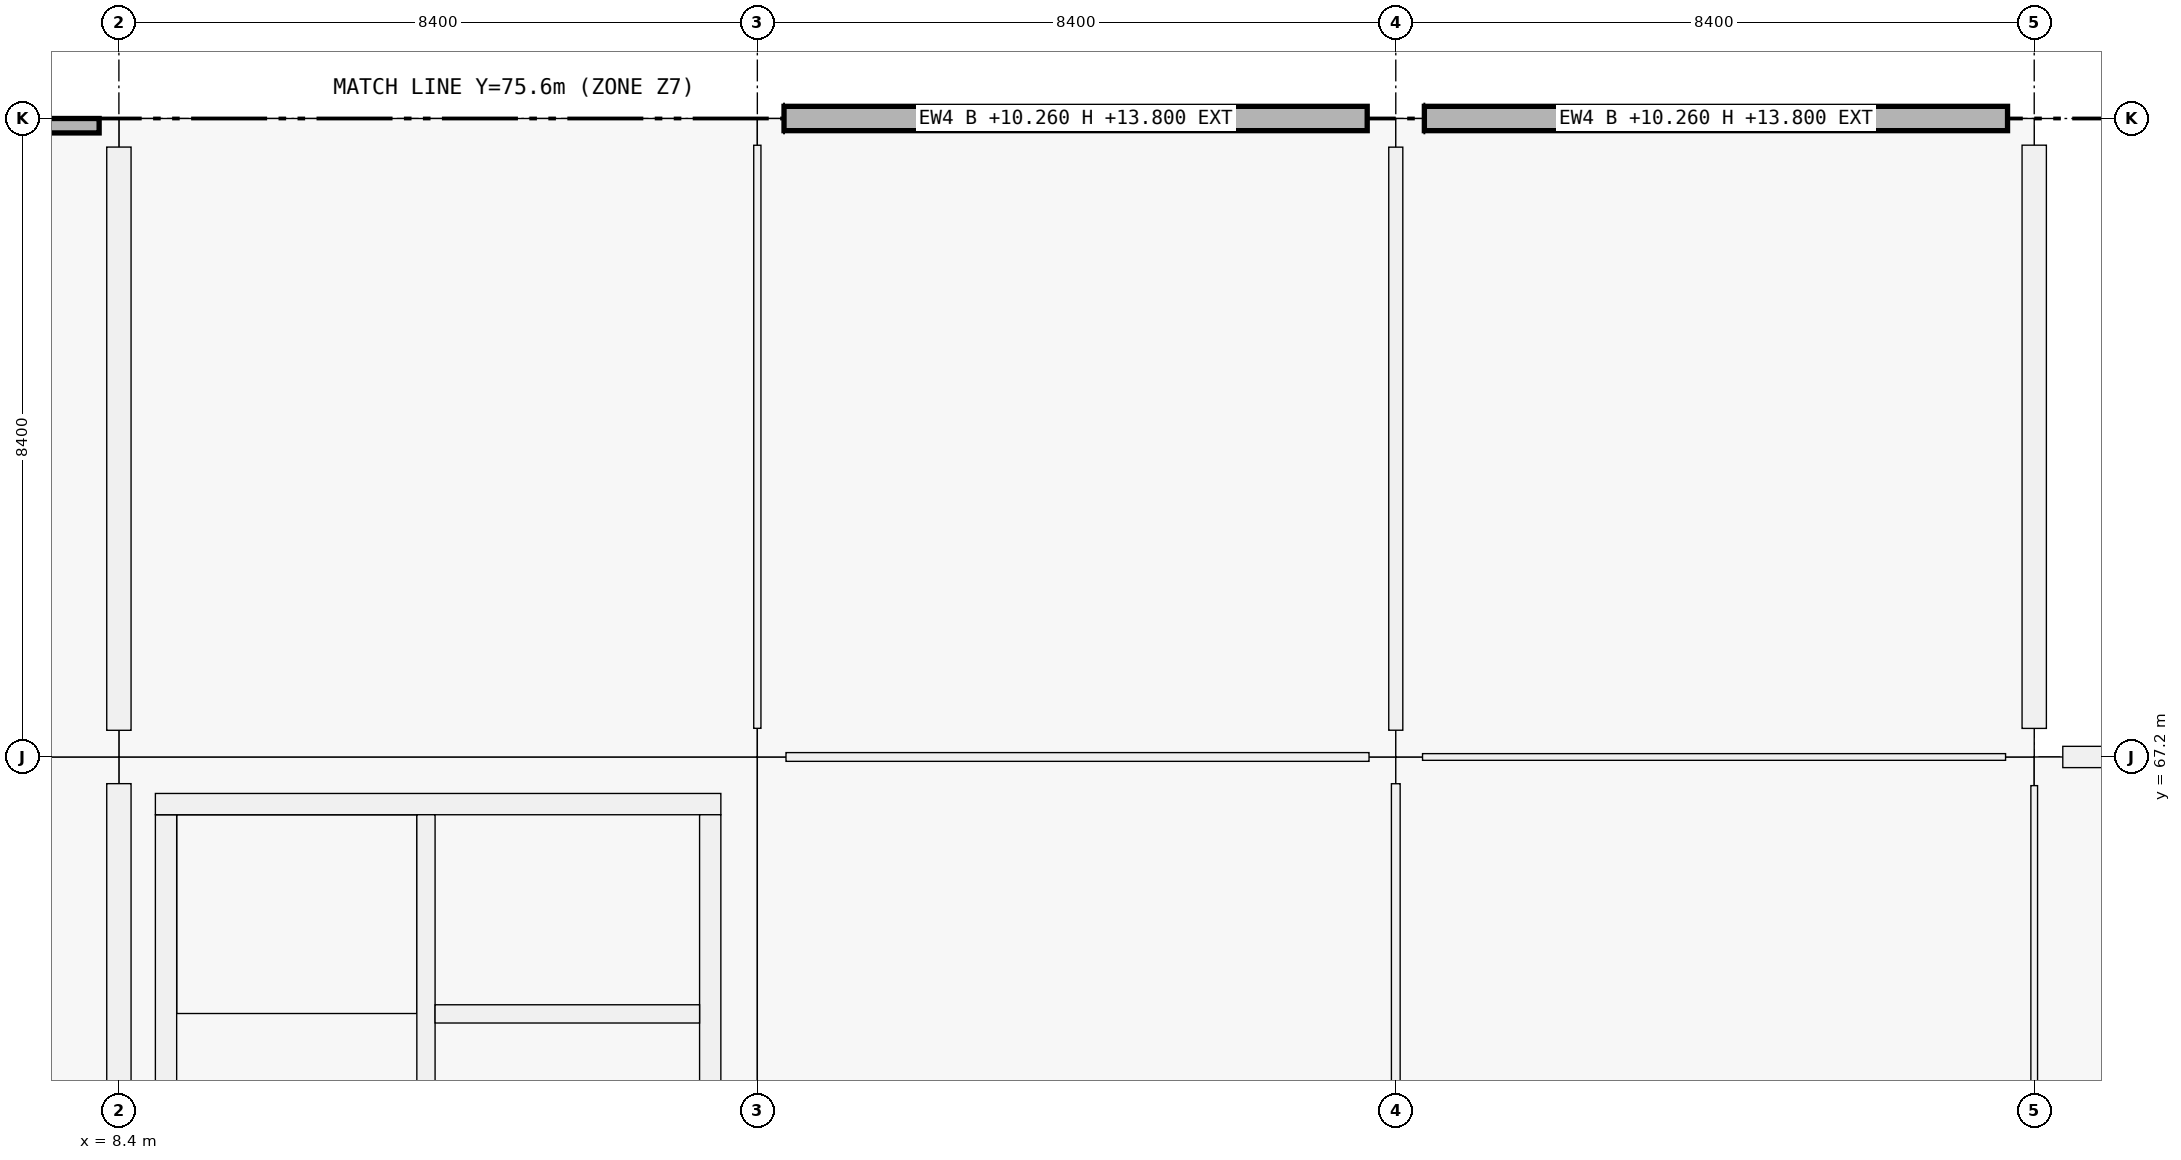
"""IFC4 building model, lengths in metres.
Left out: names, types, materials, properties, quantities, classifications, styles, units other than length and angle.
Written with IfcOpenShell. Run it as: python <this file> out.ifc"""

import sys

from ifc_helpers import new_model, si_unit, direction, frame, frame_2d, origin, origin_2d, place, context, subcontext, project, spatial, rectangle, extrude, element, fill, save


model = new_model("IFC4")
c1 = context("Model", 3, precision=1e-05, world=origin(), true_north=direction((0.0, 1.0)))
c2 = subcontext(c1, "Body", "Model", "MODEL_VIEW")
j1 = project(units=[si_unit("LENGTHUNIT", "METRE"), si_unit("PLANEANGLEUNIT", "RADIAN")], contexts=[c1])
p1 = place(None, origin())
s1 = spatial("IfcSite", under=j1, at=p1, CompositionType="ELEMENT")
p2 = place(p1, origin())
s2 = spatial("IfcBuilding", under=s1, at=p2, CompositionType="ELEMENT")
p3 = place(p2, frame((0.0, 0.0, 10.26)))
s3 = spatial("IfcBuildingStorey", under=s2, at=p3, CompositionType="ELEMENT", Elevation=10.26)
p4 = place(p3, frame((8.4, 67.2, 0.0), z_axis=(0.0, 0.0, 1.0), x_axis=(1.0, 0.0, 0.0)))
e1 = element("IfcColumn", 1, at=p4, inside=s3, PredefinedType="COLUMN", context=c2, shape_type="SweptSolid", body=[
    extrude(rectangle(XDim=0.7, YDim=0.7, at=origin_2d()), origin(), (0.0, 0.0, 1.0), 4.5),
])
for number, where, z_axis, x_axis in (
    (2, (8.4, 75.6, 0.0), (0.0, 0.0, 1.0), (1.0, 0.0, 0.0)),
    (3, (16.8, 67.2, 0.0), (0.0, 0.0, 1.0), (1.0, 0.0, 0.0)),
):
    element("IfcColumn", number, at=place(p3, frame(where, z_axis=z_axis, x_axis=x_axis)), inside=s3, PredefinedType="COLUMN", context=c2, shape_type="SweptSolid", body=[
        extrude(rectangle(XDim=0.75, YDim=0.75, at=origin_2d()), origin(), (0.0, 0.0, 1.0), 4.5),
    ])
for number, where, z_axis, x_axis in (
    (4, (16.8, 75.6, 0.0), (0.0, 0.0, 1.0), (1.0, 0.0, 0.0)),
    (5, (25.2, 67.2, 0.0), (0.0, 0.0, 1.0), (1.0, 0.0, 0.0)),
):
    element("IfcColumn", number, at=place(p3, frame(where, z_axis=z_axis, x_axis=x_axis)), inside=s3, PredefinedType="COLUMN", context=c2, shape_type="SweptSolid", body=[
        extrude(rectangle(XDim=0.7, YDim=0.7, at=origin_2d()), origin(), (0.0, 0.0, 1.0), 4.5),
    ])
for number, where, z_axis, x_axis in (
    (6, (25.2, 75.6, 0.0), (0.0, 0.0, 1.0), (1.0, 0.0, 0.0)),
    (7, (33.6, 67.2, 0.0), (0.0, 0.0, 1.0), (1.0, 0.0, 0.0)),
):
    element("IfcColumn", number, at=place(p3, frame(where, z_axis=z_axis, x_axis=x_axis)), inside=s3, PredefinedType="COLUMN", context=c2, shape_type="SweptSolid", body=[
        extrude(rectangle(XDim=0.75, YDim=0.75, at=origin_2d()), origin(), (0.0, 0.0, 1.0), 4.5),
    ])
p5 = place(p3, frame((33.6, 75.6, 0.0), z_axis=(0.0, 0.0, 1.0), x_axis=(1.0, 0.0, 0.0)))
e8 = element("IfcColumn", 8, at=p5, inside=s3, PredefinedType="COLUMN", context=c2, shape_type="SweptSolid", body=[
    extrude(rectangle(XDim=0.7, YDim=0.7, at=origin_2d()), origin(), (0.0, 0.0, 1.0), 4.5),
])
p6 = place(p3, frame((8.4, 59.176, 0.0), z_axis=(0.0, 0.0, 1.0), x_axis=(0.0, 1.0, 0.0)))
e9 = element("IfcWall", 9, at=p6, inside=s3, PredefinedType="SOLIDWALL", context=c2, shape_type="SweptSolid", body=[
    extrude(rectangle(XDim=7.673, YDim=0.32, at=frame_2d((3.836, 0.0))), origin(), (0.0, 0.0, 1.0), 3.54),
])
p7 = place(p3, frame((8.4, 67.551, 0.0), z_axis=(0.0, 0.0, 1.0), x_axis=(0.0, 1.0, 0.0)))
e10 = element("IfcWall", 10, at=p7, inside=s3, PredefinedType="SOLIDWALL", context=c2, shape_type="SweptSolid", body=[
    extrude(rectangle(XDim=7.673, YDim=0.32, at=frame_2d((3.836, 0.0))), origin(), (0.0, 0.0, 1.0), 3.54),
])
p8 = place(p7, frame((2.787, 0.0, 0.9)))
e11 = element("IfcOpeningElement", 11, at=p8, cuts=e10, PredefinedType="OPENING", context=c2, shape_type="SweptSolid", body=[
    extrude(rectangle(XDim=2.1, YDim=1.8, at=frame_2d((1.05, 0.9))), frame((0.0, 0.16, 0.0), z_axis=(0.0, -1.0, 0.0), x_axis=(1.0, 0.0, 0.0)), (0.0, 0.0, 1.0), 0.32),
])
p9 = place(p3, frame((17.151, 75.6, 0.0), z_axis=(0.0, 0.0, 1.0), x_axis=(1.0, 0.0, 0.0)))
e12 = element("IfcWall", 12, at=p9, inside=s3, PredefinedType="SOLIDWALL", context=c2, shape_type="SweptSolid", body=[
    extrude(rectangle(XDim=7.673, YDim=0.32, at=frame_2d((3.836, 0.0))), origin(), (0.0, 0.0, 1.0), 3.54),
])
p10 = place(p9, frame((2.636, 0.0, 0.9)))
e13 = element("IfcOpeningElement", 13, at=p10, cuts=e12, PredefinedType="OPENING", context=c2, shape_type="SweptSolid", body=[
    extrude(rectangle(XDim=2.4, YDim=1.8, at=frame_2d((1.2, 0.9))), frame((0.0, 0.16, 0.0), z_axis=(0.0, -1.0, 0.0), x_axis=(1.0, 0.0, 0.0)), (0.0, 0.0, 1.0), 0.32),
])
p11 = place(p3, frame((25.576, 75.6, 0.0), z_axis=(0.0, 0.0, 1.0), x_axis=(1.0, 0.0, 0.0)))
e14 = element("IfcWall", 14, at=p11, inside=s3, PredefinedType="SOLIDWALL", context=c2, shape_type="SweptSolid", body=[
    extrude(rectangle(XDim=7.673, YDim=0.32, at=frame_2d((3.836, 0.0))), origin(), (0.0, 0.0, 1.0), 3.54),
])
p12 = place(p11, frame((2.337, 0.0, 0.9)))
e15 = element("IfcOpeningElement", 15, at=p12, cuts=e14, PredefinedType="OPENING", context=c2, shape_type="SweptSolid", body=[
    extrude(rectangle(XDim=3.0, YDim=1.2, at=frame_2d((1.5, 0.6))), frame((0.0, 0.16, 0.0), z_axis=(0.0, -1.0, 0.0), x_axis=(1.0, 0.0, 0.0)), (0.0, 0.0, 1.0), 0.32),
])
p13 = place(p3, frame((33.6, 75.249, 0.0), z_axis=(0.0, 0.0, 1.0), x_axis=(0.0, -1.0, 0.0)))
e16 = element("IfcWall", 16, at=p13, inside=s3, PredefinedType="SOLIDWALL", context=c2, shape_type="SweptSolid", body=[
    extrude(rectangle(XDim=7.673, YDim=0.32, at=frame_2d((3.836, 0.0))), origin(), (0.0, 0.0, 1.0), 3.54),
])
p14 = place(p13, frame((2.486, 0.0, 0.9)))
e17 = element("IfcOpeningElement", 17, at=p14, cuts=e16, PredefinedType="OPENING", context=c2, shape_type="SweptSolid", body=[
    extrude(rectangle(XDim=2.7, YDim=1.2, at=frame_2d((1.35, 0.6))), frame((0.0, 0.16, 0.0), z_axis=(0.0, -1.0, 0.0), x_axis=(1.0, 0.0, 0.0)), (0.0, 0.0, 1.0), 0.32),
])
p15 = place(p3, frame((33.976, 67.2, 0.0), z_axis=(0.0, 0.0, 1.0), x_axis=(1.0, 0.0, 0.0)))
e18 = element("IfcWall", 18, at=p15, inside=s3, PredefinedType="SOLIDWALL", context=c2, shape_type="SweptSolid", body=[
    extrude(rectangle(XDim=7.673, YDim=0.28, at=frame_2d((3.836, 0.0))), origin(), (0.0, 0.0, 1.0), 3.54),
])
p16 = place(p15, frame((2.937, 0.0, 0.9)))
e19 = element("IfcOpeningElement", 19, at=p16, cuts=e18, PredefinedType="OPENING", context=c2, shape_type="SweptSolid", body=[
    extrude(rectangle(XDim=1.8, YDim=1.35, at=frame_2d((0.9, 0.675))), frame((0.0, 0.14, 0.0), z_axis=(0.0, -1.0, 0.0), x_axis=(1.0, 0.0, 0.0)), (0.0, 0.0, 1.0), 0.28),
])
p17 = place(p3, frame((0.26, 75.505, 0.0), z_axis=(0.0, 0.0, 1.0), x_axis=(1.0, 0.0, 0.0)))
e20 = element("IfcWall", 20, at=p17, inside=s3, PredefinedType="PARAPET", context=c2, shape_type="SweptSolid", body=[
    extrude(rectangle(XDim=7.88, YDim=0.19, at=frame_2d((3.94, 0.0))), origin(), (0.0, 0.0, 1.0), 0.95),
])
p18 = place(p3, frame((9.02, 59.56, 0.0), z_axis=(0.0, 0.0, 1.0), x_axis=(0.0, 1.0, 0.0)))
e21 = element("IfcWall", 21, at=p18, inside=s3, PredefinedType="SHEAR", context=c2, shape_type="SweptSolid", body=[
    extrude(rectangle(XDim=6.88, YDim=0.28, at=frame_2d((3.44, 0.0))), origin(), (0.0, 0.0, 1.0), 4.5),
])
p19 = place(p3, frame((8.88, 66.58, 0.0), z_axis=(0.0, 0.0, 1.0), x_axis=(1.0, 0.0, 0.0)))
e22 = element("IfcWall", 22, at=p19, inside=s3, PredefinedType="SHEAR", context=c2, shape_type="SweptSolid", body=[
    extrude(rectangle(XDim=7.44, YDim=0.28, at=frame_2d((3.72, 0.0))), origin(), (0.0, 0.0, 1.0), 4.5),
])
p20 = place(p3, frame((16.18, 66.44, 0.0), z_axis=(0.0, 0.0, 1.0), x_axis=(0.0, -1.0, 0.0)))
e23 = element("IfcWall", 23, at=p20, inside=s3, PredefinedType="SHEAR", context=c2, shape_type="SweptSolid", body=[
    extrude(rectangle(XDim=6.88, YDim=0.28, at=frame_2d((3.44, 0.0))), origin(), (0.0, 0.0, 1.0), 4.5),
])
p21 = place(p3, frame((12.44, 59.56, 0.0), z_axis=(0.0, 0.0, 1.0), x_axis=(0.0, 1.0, 0.0)))
e24 = element("IfcWall", 24, at=p21, inside=s3, PredefinedType="SHEAR", context=c2, shape_type="SweptSolid", body=[
    extrude(rectangle(XDim=6.88, YDim=0.24, at=frame_2d((3.44, 0.0))), origin(), (0.0, 0.0, 1.0), 4.5),
])
p22 = place(p21, frame((0.12, 0.0, 0.0)))
e25 = element("IfcOpeningElement", 25, at=p22, cuts=e24, PredefinedType="OPENING", context=c2, shape_type="SweptSolid", body=[
    extrude(rectangle(XDim=1.0, YDim=2.15, at=frame_2d((0.5, 1.075))), frame((0.0, 0.12, 0.0), z_axis=(0.0, -1.0, 0.0), x_axis=(1.0, 0.0, 0.0)), (0.0, 0.0, 1.0), 0.24),
])
p23 = place(p3, frame((12.56, 63.82, 0.0), z_axis=(0.0, 0.0, 1.0), x_axis=(1.0, 0.0, 0.0)))
e26 = element("IfcWall", 26, at=p23, inside=s3, PredefinedType="SHEAR", context=c2, shape_type="SweptSolid", body=[
    extrude(rectangle(XDim=3.48, YDim=0.24, at=frame_2d((1.74, 0.0))), origin(), (0.0, 0.0, 1.0), 4.5),
])
p24 = place(p23, frame((1.19, 0.0, 0.0)))
e27 = element("IfcOpeningElement", 27, at=p24, cuts=e26, PredefinedType="OPENING", context=c2, shape_type="SweptSolid", body=[
    extrude(rectangle(XDim=1.1, YDim=2.15, at=frame_2d((0.55, 1.075))), frame((0.0, 0.12, 0.0), z_axis=(0.0, -1.0, 0.0), x_axis=(1.0, 0.0, 0.0)), (0.0, 0.0, 1.0), 0.24),
])
p25 = place(p3, frame((17.177, 67.2, 0.0), z_axis=(0.0, 0.0, 1.0), x_axis=(1.0, 0.0, 0.0)))
e28 = element("IfcWall", 28, at=p25, inside=s3, PredefinedType="PARTITIONING", context=c2, shape_type="SweptSolid", body=[
    extrude(rectangle(XDim=7.671, YDim=0.115, at=frame_2d((3.835, 0.0))), origin(), (0.0, 0.0, 1.0), 3.37),
])
p26 = place(p25, frame((3.316, 0.0, 0.0)))
e29 = element("IfcOpeningElement", 29, at=p26, cuts=e28, PredefinedType="OPENING", context=c2, shape_type="SweptSolid", body=[
    extrude(rectangle(XDim=1.04, YDim=2.2, at=frame_2d((0.52, 1.1))), frame((0.0, 0.058, 0.0), z_axis=(0.0, -1.0, 0.0), x_axis=(1.0, 0.0, 0.0)), (0.0, 0.0, 1.0), 0.115),
])
p27 = place(p3, frame((25.552, 67.2, 0.0), z_axis=(0.0, 0.0, 1.0), x_axis=(1.0, 0.0, 0.0)))
e30 = element("IfcWall", 30, at=p27, inside=s3, PredefinedType="PARTITIONING", context=c2, shape_type="SweptSolid", body=[
    extrude(rectangle(XDim=7.671, YDim=0.088, at=frame_2d((3.835, 0.0))), origin(), (0.0, 0.0, 1.0), 3.37),
])
p28 = place(p27, frame((3.316, 0.0, 0.0)))
e31 = element("IfcOpeningElement", 31, at=p28, cuts=e30, PredefinedType="OPENING", context=c2, shape_type="SweptSolid", body=[
    extrude(rectangle(XDim=1.04, YDim=2.2, at=frame_2d((0.52, 1.1))), frame((0.0, 0.044, 0.0), z_axis=(0.0, -1.0, 0.0), x_axis=(1.0, 0.0, 0.0)), (0.0, 0.0, 1.0), 0.088),
])
p29 = place(p3, frame((16.8, 67.577, 0.0), z_axis=(0.0, 0.0, 1.0), x_axis=(0.0, 1.0, 0.0)))
e32 = element("IfcWall", 32, at=p29, inside=s3, PredefinedType="PARTITIONING", context=c2, shape_type="SweptSolid", body=[
    extrude(rectangle(XDim=7.671, YDim=0.095, at=frame_2d((3.835, 0.0))), origin(), (0.0, 0.0, 1.0), 3.37),
])
p30 = place(p29, frame((3.311, 0.0, 0.0)))
e33 = element("IfcOpeningElement", 33, at=p30, cuts=e32, PredefinedType="OPENING", context=c2, shape_type="SweptSolid", body=[
    extrude(rectangle(XDim=1.05, YDim=2.12, at=frame_2d((0.525, 1.06))), frame((0.0, 0.047, 0.0), z_axis=(0.0, -1.0, 0.0), x_axis=(1.0, 0.0, 0.0)), (0.0, 0.0, 1.0), 0.095),
])
p31 = place(p3, frame((25.2, 59.177, 0.0), z_axis=(0.0, 0.0, 1.0), x_axis=(0.0, 1.0, 0.0)))
e34 = element("IfcWall", 34, at=p31, inside=s3, PredefinedType="PARTITIONING", context=c2, shape_type="SweptSolid", body=[
    extrude(rectangle(XDim=7.671, YDim=0.115, at=frame_2d((3.835, 0.0))), origin(), (0.0, 0.0, 1.0), 3.37),
])
p32 = place(p31, frame((3.316, 0.0, 0.0)))
e35 = element("IfcOpeningElement", 35, at=p32, cuts=e34, PredefinedType="OPENING", context=c2, shape_type="SweptSolid", body=[
    extrude(rectangle(XDim=1.04, YDim=2.2, at=frame_2d((0.52, 1.1))), frame((0.0, 0.058, 0.0), z_axis=(0.0, -1.0, 0.0), x_axis=(1.0, 0.0, 0.0)), (0.0, 0.0, 1.0), 0.115),
])
p33 = place(p3, frame((25.2, 67.552, 0.0), z_axis=(0.0, 0.0, 1.0), x_axis=(0.0, 1.0, 0.0)))
e36 = element("IfcWall", 36, at=p33, inside=s3, PredefinedType="PARTITIONING", context=c2, shape_type="SweptSolid", body=[
    extrude(rectangle(XDim=7.671, YDim=0.185, at=frame_2d((3.835, 0.0))), origin(), (0.0, 0.0, 1.0), 3.37),
])
p34 = place(p33, frame((3.356, 0.0, 0.0)))
e37 = element("IfcOpeningElement", 37, at=p34, cuts=e36, PredefinedType="OPENING", context=c2, shape_type="SweptSolid", body=[
    extrude(rectangle(XDim=0.96, YDim=2.18, at=frame_2d((0.48, 1.09))), frame((0.0, 0.093, 0.0), z_axis=(0.0, -1.0, 0.0), x_axis=(1.0, 0.0, 0.0)), (0.0, 0.0, 1.0), 0.185),
])
p35 = place(p3, frame((33.6, 59.152, 0.0), z_axis=(0.0, 0.0, 1.0), x_axis=(0.0, 1.0, 0.0)))
e38 = element("IfcWall", 38, at=p35, inside=s3, PredefinedType="PARTITIONING", context=c2, shape_type="SweptSolid", body=[
    extrude(rectangle(XDim=7.671, YDim=0.088, at=frame_2d((3.835, 0.0))), origin(), (0.0, 0.0, 1.0), 3.37),
])
p36 = place(p35, frame((3.365, 0.0, 0.0)))
e39 = element("IfcOpeningElement", 39, at=p36, cuts=e38, PredefinedType="OPENING", context=c2, shape_type="SweptSolid", body=[
    extrude(rectangle(XDim=0.94, YDim=2.15, at=frame_2d((0.47, 1.075))), frame((0.0, 0.044, 0.0), z_axis=(0.0, -1.0, 0.0), x_axis=(1.0, 0.0, 0.0)), (0.0, 0.0, 1.0), 0.088),
])
p37 = place(p8, origin())
e40 = element("IfcWindow", 40, at=p37, inside=s3, PartitioningType="SINGLE_PANEL", PredefinedType="WINDOW", context=c2, shape_type="SweptSolid", body=[
    extrude(rectangle(XDim=2.1, YDim=1.8, at=frame_2d((1.05, 0.9))), frame((0.0, 0.03, 0.0), z_axis=(0.0, -1.0, 0.0), x_axis=(1.0, 0.0, 0.0)), (0.0, 0.0, 1.0), 0.06),
])
fill(e11, e40)
p38 = place(p10, origin())
e41 = element("IfcWindow", 41, at=p38, inside=s3, PartitioningType="SINGLE_PANEL", PredefinedType="WINDOW", context=c2, shape_type="SweptSolid", body=[
    extrude(rectangle(XDim=2.4, YDim=1.8, at=frame_2d((1.2, 0.9))), frame((0.0, 0.03, 0.0), z_axis=(0.0, -1.0, 0.0), x_axis=(1.0, 0.0, 0.0)), (0.0, 0.0, 1.0), 0.06),
])
fill(e13, e41)
p39 = place(p12, origin())
e42 = element("IfcWindow", 42, at=p39, inside=s3, PartitioningType="SINGLE_PANEL", PredefinedType="WINDOW", context=c2, shape_type="SweptSolid", body=[
    extrude(rectangle(XDim=3.0, YDim=1.2, at=frame_2d((1.5, 0.6))), frame((0.0, 0.03, 0.0), z_axis=(0.0, -1.0, 0.0), x_axis=(1.0, 0.0, 0.0)), (0.0, 0.0, 1.0), 0.06),
])
fill(e15, e42)
p40 = place(p14, origin())
e43 = element("IfcWindow", 43, at=p40, inside=s3, PartitioningType="SINGLE_PANEL", PredefinedType="WINDOW", context=c2, shape_type="SweptSolid", body=[
    extrude(rectangle(XDim=2.7, YDim=1.2, at=frame_2d((1.35, 0.6))), frame((0.0, 0.03, 0.0), z_axis=(0.0, -1.0, 0.0), x_axis=(1.0, 0.0, 0.0)), (0.0, 0.0, 1.0), 0.06),
])
fill(e17, e43)
p41 = place(p24, origin())
e44 = element("IfcDoor", 44, at=p41, inside=s3, OperationType="DOUBLE_DOOR_SLIDING", PredefinedType="DOOR", context=c2, shape_type="SweptSolid", body=[
    extrude(rectangle(XDim=1.1, YDim=2.15, at=frame_2d((0.55, 1.075))), frame((0.0, 0.025, 0.0), z_axis=(0.0, -1.0, 0.0), x_axis=(1.0, 0.0, 0.0)), (0.0, 0.0, 1.0), 0.05),
])
fill(e27, e44)
p42 = place(p26, origin())
e45 = element("IfcDoor", 45, at=p42, inside=s3, OperationType="SINGLE_SWING_LEFT", PredefinedType="DOOR", context=c2, shape_type="SweptSolid", body=[
    extrude(rectangle(XDim=1.04, YDim=2.2, at=frame_2d((0.52, 1.1))), frame((0.0, 0.025, 0.0), z_axis=(0.0, -1.0, 0.0), x_axis=(1.0, 0.0, 0.0)), (0.0, 0.0, 1.0), 0.05),
])
fill(e29, e45)
p43 = place(p32, origin())
e46 = element("IfcDoor", 46, at=p43, inside=s3, OperationType="SINGLE_SWING_RIGHT", PredefinedType="DOOR", context=c2, shape_type="SweptSolid", body=[
    extrude(rectangle(XDim=1.04, YDim=2.2, at=frame_2d((0.52, 1.1))), frame((0.0, 0.025, 0.0), z_axis=(0.0, -1.0, 0.0), x_axis=(1.0, 0.0, 0.0)), (0.0, 0.0, 1.0), 0.05),
])
fill(e35, e46)
p44 = place(p28, origin())
e47 = element("IfcDoor", 47, at=p44, inside=s3, OperationType="SINGLE_SWING_RIGHT", PredefinedType="DOOR", context=c2, shape_type="SweptSolid", body=[
    extrude(rectangle(XDim=1.04, YDim=2.2, at=frame_2d((0.52, 1.1))), frame((0.0, 0.025, 0.0), z_axis=(0.0, -1.0, 0.0), x_axis=(1.0, 0.0, 0.0)), (0.0, 0.0, 1.0), 0.05),
])
fill(e31, e47)
p45 = place(p30, origin())
e48 = element("IfcDoor", 48, at=p45, inside=s3, OperationType="SINGLE_SWING_LEFT", PredefinedType="DOOR", context=c2, shape_type="SweptSolid", body=[
    extrude(rectangle(XDim=1.05, YDim=2.12, at=frame_2d((0.525, 1.06))), frame((0.0, 0.025, 0.0), z_axis=(0.0, -1.0, 0.0), x_axis=(1.0, 0.0, 0.0)), (0.0, 0.0, 1.0), 0.05),
])
fill(e33, e48)
p46 = place(p34, origin())
e49 = element("IfcDoor", 49, at=p46, inside=s3, OperationType="SINGLE_SWING_RIGHT", PredefinedType="DOOR", context=c2, shape_type="SweptSolid", body=[
    extrude(rectangle(XDim=0.96, YDim=2.18, at=frame_2d((0.48, 1.09))), frame((0.0, 0.025, 0.0), z_axis=(0.0, -1.0, 0.0), x_axis=(1.0, 0.0, 0.0)), (0.0, 0.0, 1.0), 0.05),
])
fill(e37, e49)
p47 = place(p36, origin())
e50 = element("IfcDoor", 50, at=p47, inside=s3, OperationType="SINGLE_SWING_LEFT", PredefinedType="DOOR", context=c2, shape_type="SweptSolid", body=[
    extrude(rectangle(XDim=0.94, YDim=2.15, at=frame_2d((0.47, 1.075))), frame((0.0, 0.025, 0.0), z_axis=(0.0, -1.0, 0.0), x_axis=(1.0, 0.0, 0.0)), (0.0, 0.0, 1.0), 0.05),
])
fill(e39, e50)
save(model, sys.argv[1])
